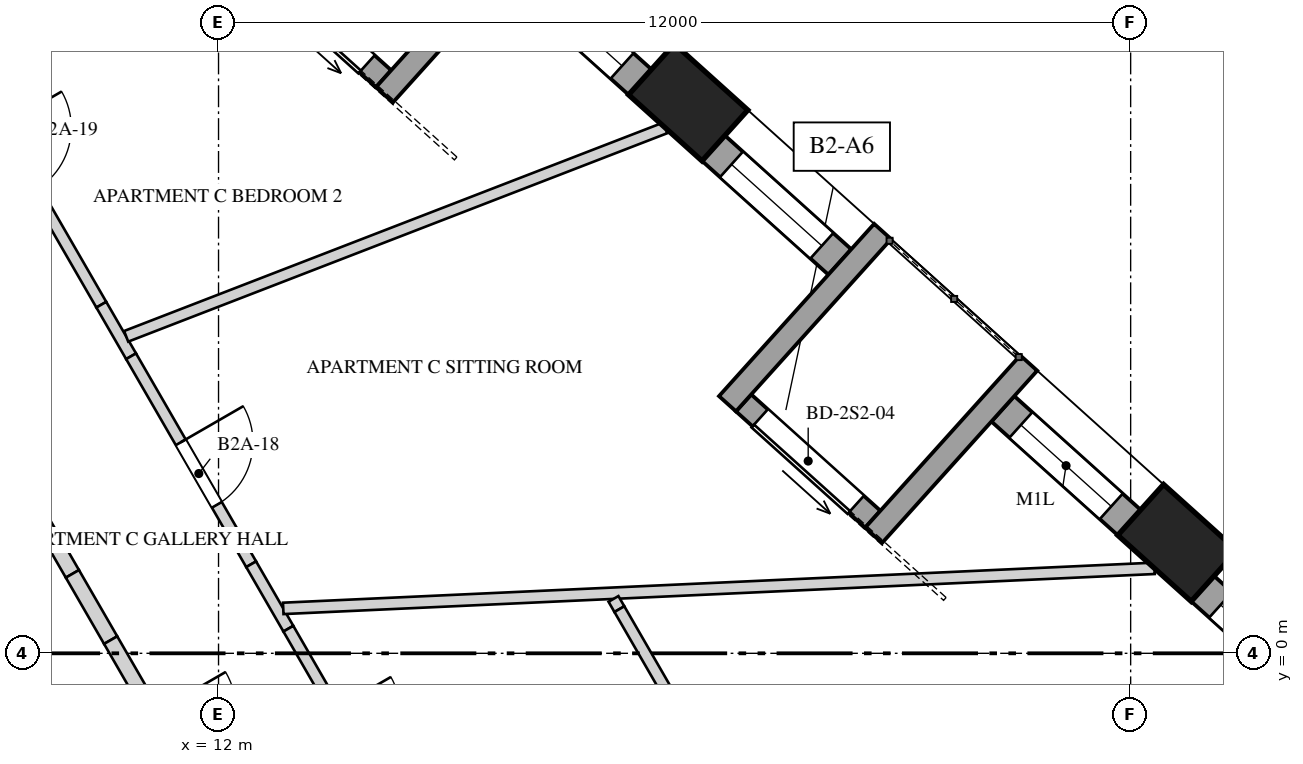
"""IFC4 building model, lengths in metres.
Left out: names, types, materials, properties, quantities, classifications, styles, units other than length and angle.
Written with IfcOpenShell. Run it as: python <this file> out.ifc"""

import sys

from ifc_helpers import new_model, si_unit, direction, frame, frame_2d, origin, origin_2d, place, context, subcontext, project, spatial, rectangle, extrude, element, fill, save


model = new_model("IFC4")
c1 = context("Model", 3, precision=1e-05, world=origin(), true_north=direction((0.0, 1.0)))
c2 = subcontext(c1, "Body", "Model", "MODEL_VIEW")
j1 = project(units=[si_unit("LENGTHUNIT", "METRE"), si_unit("PLANEANGLEUNIT", "RADIAN")], contexts=[c1])
p1 = place(None, origin())
s1 = spatial("IfcSite", under=j1, at=p1, CompositionType="ELEMENT")
p2 = place(p1, origin())
s2 = spatial("IfcBuilding", under=s1, at=p2, CompositionType="ELEMENT")
p3 = place(p2, frame((0.0, 0.0, 88.4)))
s3 = spatial("IfcBuildingStorey", under=s2, at=p3, CompositionType="ELEMENT", Elevation=88.4)
p4 = place(p3, frame((9.699, -4.25, 0.0), z_axis=(0.0, 0.0, 1.0), x_axis=(-0.499999102847, 0.866025921755, 0.0)))
e1 = element("IfcWall", 1, at=p4, inside=s3, PredefinedType="SHEAR", context=c2, shape_type="SweptSolid", body=[
    extrude(rectangle(XDim=17.061, YDim=0.95, at=frame_2d((8.53, 0.0))), origin(), (0.0, 0.0, 1.0), 4.0),
])
p5 = place(p4, frame((6.805, 0.0, 0.0)))
e2 = element("IfcOpeningElement", 2, at=p5, cuts=e1, PredefinedType="OPENING", context=c2, shape_type="SweptSolid", body=[
    extrude(rectangle(XDim=1.0, YDim=2.4, at=frame_2d((0.5, 1.2))), frame((0.0, 0.485, 0.0), z_axis=(0.0, -1.0, 0.0), x_axis=(1.0, 0.0, 0.0)), (0.0, 0.0, 1.0), 0.97),
])
for number, where, z_axis, x_axis in (
    (3, (24.615, 1.452, -0.35), (0.0, 0.0, 1.0), (-0.743, 0.669, 0.0)),
    (4, (18.179, 7.247, -0.35), (0.0, 0.0, 1.0), (-0.743, 0.669, 0.0)),
):
    element("IfcColumn", number, at=place(p3, frame(where, z_axis=z_axis, x_axis=x_axis)), inside=s3, PredefinedType="COLUMN", context=c2, shape_type="SweptSolid", body=[
        extrude(rectangle(XDim=1.3, YDim=0.9, at=origin_2d()), origin(), (0.0, 0.0, 1.0), 4.35),
    ])
p6 = place(p3, frame((29.86, -3.573, 0.0), z_axis=(0.0, 0.0, 1.0), x_axis=(-0.743161908204, 0.669111633582, 0.0)))
e5 = element("IfcWall", 5, at=p6, inside=s3, PredefinedType="SOLIDWALL", context=c2, shape_type="SweptSolid", body=[
    extrude(rectangle(XDim=6.61, YDim=0.45, at=frame_2d((3.305, 0.0))), origin(), (0.0, 0.0, 1.0), 3.3),
])
p7 = place(p6, frame((0.243, 0.0, 0.7)))
e6 = element("IfcOpeningElement", 6, at=p7, cuts=e5, PredefinedType="OPENING", context=c2, shape_type="SweptSolid", body=[
    extrude(rectangle(XDim=1.0, YDim=1.8, at=frame_2d((0.5, 0.9))), frame((0.0, 0.235, 0.0), z_axis=(0.0, -1.0, 0.0), x_axis=(1.0, 0.0, 0.0)), (0.0, 0.0, 1.0), 0.47),
])
p8 = place(p6, frame((2.13, 0.0, 0.7)))
e7 = element("IfcOpeningElement", 7, at=p8, cuts=e5, PredefinedType="OPENING", context=c2, shape_type="SweptSolid", body=[
    extrude(rectangle(XDim=1.6, YDim=2.3, at=frame_2d((0.8, 1.15))), frame((0.0, 0.235, 0.0), z_axis=(0.0, -1.0, 0.0), x_axis=(1.0, 0.0, 0.0)), (0.0, 0.0, 1.0), 0.47),
])
p9 = place(p6, frame((4.692, 0.0, 0.7)))
e8 = element("IfcOpeningElement", 8, at=p9, cuts=e5, PredefinedType="OPENING", context=c2, shape_type="SweptSolid", body=[
    extrude(rectangle(XDim=1.6, YDim=2.3, at=frame_2d((0.8, 1.15))), frame((0.0, 0.235, 0.0), z_axis=(0.0, -1.0, 0.0), x_axis=(1.0, 0.0, 0.0)), (0.0, 0.0, 1.0), 0.47),
])
p10 = place(p3, frame((23.981, 1.72, 0.0), z_axis=(0.0, 0.0, 1.0), x_axis=(-0.743142151309, 0.669133576311, 0.0)))
e9 = element("IfcWall", 9, at=p10, inside=s3, PredefinedType="SOLIDWALL", context=c2, shape_type="SweptSolid", body=[
    extrude(rectangle(XDim=2.237, YDim=0.45, at=frame_2d((1.118, 0.0))), origin(), (0.0, 0.0, 1.0), 3.3),
])
p11 = place(p10, frame((0.318, 0.0, 0.7)))
e10 = element("IfcOpeningElement", 10, at=p11, cuts=e9, PredefinedType="OPENING", context=c2, shape_type="SweptSolid", body=[
    extrude(rectangle(XDim=1.6, YDim=1.8, at=frame_2d((0.8, 0.9))), frame((0.0, 0.235, 0.0), z_axis=(0.0, -1.0, 0.0), x_axis=(1.0, 0.0, 0.0)), (0.0, 0.0, 1.0), 0.47),
])
p12 = place(p3, frame((20.174, 5.148, 0.0), z_axis=(0.0, 0.0, 1.0), x_axis=(-0.743136746477, 0.669139578889, 0.0)))
e11 = element("IfcWall", 11, at=p12, inside=s3, PredefinedType="SOLIDWALL", context=c2, shape_type="SweptSolid", body=[
    extrude(rectangle(XDim=2.237, YDim=0.45, at=frame_2d((1.119, 0.0))), origin(), (0.0, 0.0, 1.0), 3.3),
])
p13 = place(p12, frame((0.318, 0.0, 0.7)))
e12 = element("IfcOpeningElement", 12, at=p13, cuts=e11, PredefinedType="OPENING", context=c2, shape_type="SweptSolid", body=[
    extrude(rectangle(XDim=1.6, YDim=2.3, at=frame_2d((0.8, 1.15))), frame((0.0, 0.235, 0.0), z_axis=(0.0, -1.0, 0.0), x_axis=(1.0, 0.0, 0.0)), (0.0, 0.0, 1.0), 0.47),
])
p14 = place(p3, frame((17.545, 7.515, 0.0), z_axis=(0.0, 0.0, 1.0), x_axis=(-0.743142151309, 0.669133576311, 0.0)))
e13 = element("IfcWall", 13, at=p14, inside=s3, PredefinedType="SOLIDWALL", context=c2, shape_type="SweptSolid", body=[
    extrude(rectangle(XDim=2.237, YDim=0.45, at=frame_2d((1.118, 0.0))), origin(), (0.0, 0.0, 1.0), 3.3),
])
p15 = place(p14, frame((0.318, 0.0, 0.7)))
e14 = element("IfcOpeningElement", 14, at=p15, cuts=e13, PredefinedType="OPENING", context=c2, shape_type="SweptSolid", body=[
    extrude(rectangle(XDim=1.6, YDim=2.3, at=frame_2d((0.8, 1.15))), frame((0.0, 0.235, 0.0), z_axis=(0.0, -1.0, 0.0), x_axis=(1.0, 0.0, 0.0)), (0.0, 0.0, 1.0), 0.47),
])
p16 = place(p3, frame((20.607, 1.764, 0.0), z_axis=(0.0, 0.0, 1.0), x_axis=(-0.743182653308, 0.669088591909, 0.0)))
e15 = element("IfcWall", 15, at=p16, inside=s3, PredefinedType="SOLIDWALL", context=c2, shape_type="SweptSolid", body=[
    extrude(rectangle(XDim=2.287, YDim=0.3, at=frame_2d((1.143, 0.0))), origin(), (0.0, 0.0, 1.0), 3.3),
])
p17 = place(p16, frame((0.293, 0.0, 0.0)))
e16 = element("IfcOpeningElement", 16, at=p17, cuts=e15, PredefinedType="OPENING", context=c2, shape_type="SweptSolid", body=[
    extrude(rectangle(XDim=1.7, YDim=2.4, at=frame_2d((0.85, 1.2))), frame((0.0, 0.16, 0.0), z_axis=(0.0, -1.0, 0.0), x_axis=(1.0, 0.0, 0.0)), (0.0, 0.0, 1.0), 0.32),
])
for number, where, z_axis, x_axis in (
    (17, (22.659, 3.819, 0.0), (0.0, 0.0, 1.0), (-0.669, -0.743, 0.0)),
    (18, (20.737, 5.55, 0.0), (0.0, 0.0, 1.0), (-0.669, -0.743, 0.0)),
):
    element("IfcWall", number, at=place(p3, frame(where, z_axis=z_axis, x_axis=x_axis)), inside=s3, PredefinedType="SOLIDWALL", context=c2, shape_type="SweptSolid", body=[
        extrude(rectangle(XDim=3.05, YDim=0.3, at=frame_2d((1.525, 0.0))), origin(), (0.0, 0.0, 1.0), 3.3),
    ])
p18 = place(p3, frame((14.171, 7.559, 0.0), z_axis=(0.0, 0.0, 1.0), x_axis=(-0.743134851659, 0.66914168324, 0.0)))
e19 = element("IfcWall", 19, at=p18, inside=s3, PredefinedType="SOLIDWALL", context=c2, shape_type="SweptSolid", body=[
    extrude(rectangle(XDim=2.287, YDim=0.3, at=frame_2d((1.143, 0.0))), origin(), (0.0, 0.0, 1.0), 3.3),
])
p19 = place(p18, frame((0.293, 0.0, 0.0)))
e20 = element("IfcOpeningElement", 20, at=p19, cuts=e19, PredefinedType="OPENING", context=c2, shape_type="SweptSolid", body=[
    extrude(rectangle(XDim=1.7, YDim=2.4, at=frame_2d((0.85, 1.2))), frame((0.0, 0.16, 0.0), z_axis=(0.0, -1.0, 0.0), x_axis=(1.0, 0.0, 0.0)), (0.0, 0.0, 1.0), 0.32),
])
p20 = place(p3, frame((16.223, 9.614, 0.0), z_axis=(0.0, 0.0, 1.0), x_axis=(-0.669115082961, -0.743158802514, 0.0)))
e21 = element("IfcWall", 21, at=p20, inside=s3, PredefinedType="SOLIDWALL", context=c2, shape_type="SweptSolid", body=[
    extrude(rectangle(XDim=3.05, YDim=0.3, at=frame_2d((1.525, 0.0))), origin(), (0.0, 0.0, 1.0), 3.3),
])
p21 = place(p3, frame((8.163, 8.562, 0.0), z_axis=(0.0, 0.0, 1.0), x_axis=(0.500023253097, -0.866011978186, 0.0)))
e22 = element("IfcWall", 22, at=p21, inside=s3, PredefinedType="PARTITIONING", context=c2, shape_type="SweptSolid", body=[
    extrude(rectangle(XDim=4.59, YDim=0.15, at=frame_2d((2.295, 0.0))), origin(), (0.0, 0.0, 1.0), 3.65),
])
p22 = place(p21, frame((1.9, 0.0, 0.0)))
e23 = element("IfcOpeningElement", 23, at=p22, cuts=e22, PredefinedType="OPENING", context=c2, shape_type="SweptSolid", body=[
    extrude(rectangle(XDim=0.95, YDim=2.4, at=frame_2d((0.475, 1.2))), frame((0.0, 0.085, 0.0), z_axis=(0.0, -1.0, 0.0), x_axis=(1.0, 0.0, 0.0)), (0.0, 0.0, 1.0), 0.17),
])
p23 = place(p3, frame((10.458, 4.586, 0.0), z_axis=(0.0, 0.0, 1.0), x_axis=(0.49979442921, -0.866144057608, 0.0)))
e24 = element("IfcWall", 24, at=p23, inside=s3, PredefinedType="PARTITIONING", context=c2, shape_type="SweptSolid", body=[
    extrude(rectangle(XDim=0.783, YDim=0.15, at=frame_2d((0.392, 0.0))), origin(), (0.0, 0.0, 1.0), 2.75),
])
p24 = place(p3, frame((10.849, 3.908, 0.0), z_axis=(0.0, 0.0, 1.0), x_axis=(0.500027861653, -0.866009317254, 0.0)))
e25 = element("IfcWall", 25, at=p24, inside=s3, PredefinedType="PARTITIONING", context=c2, shape_type="SweptSolid", body=[
    extrude(rectangle(XDim=3.16, YDim=0.15, at=frame_2d((1.58, 0.0))), origin(), (0.0, 0.0, 1.0), 3.65),
])
p25 = place(p24, frame((1.307, 0.0, 0.0)))
e26 = element("IfcOpeningElement", 26, at=p25, cuts=e25, PredefinedType="OPENING", context=c2, shape_type="SweptSolid", body=[
    extrude(rectangle(XDim=0.95, YDim=2.4, at=frame_2d((0.475, 1.2))), frame((0.0, 0.085, 0.0), z_axis=(0.0, -1.0, 0.0), x_axis=(1.0, 0.0, 0.0)), (0.0, 0.0, 1.0), 0.17),
])
p26 = place(p3, frame((12.429, 1.172, 0.0), z_axis=(0.0, 0.0, 1.0), x_axis=(0.499895202697, -0.866085900082, 0.0)))
e27 = element("IfcWall", 27, at=p26, inside=s3, PredefinedType="PARTITIONING", context=c2, shape_type="SweptSolid", body=[
    extrude(rectangle(XDim=0.979, YDim=0.15, at=frame_2d((0.489, 0.0))), origin(), (0.0, 0.0, 1.0), 2.55),
])
p27 = place(p3, frame((12.919, 0.324, 0.0), z_axis=(0.0, 0.0, 1.0), x_axis=(0.500028278809, -0.866009076391, 0.0)))
e28 = element("IfcWall", 28, at=p27, inside=s3, PredefinedType="PARTITIONING", context=c2, shape_type="SweptSolid", body=[
    extrude(rectangle(XDim=1.175, YDim=0.15, at=frame_2d((0.587, 0.0))), origin(), (0.0, 0.0, 1.0), 3.65),
])
p28 = place(p3, frame((10.785, 4.17, 0.0), z_axis=(0.0, 0.0, 1.0), x_axis=(0.932701213241, 0.360650033716, 0.0)))
e29 = element("IfcWall", 29, at=p28, inside=s3, PredefinedType="PARTITIONING", context=c2, shape_type="SweptSolid", body=[
    extrude(rectangle(XDim=7.605, YDim=0.15, at=frame_2d((3.802, 0.0))), origin(), (0.0, 0.0, 1.0), 2.75),
])
p29 = place(p3, frame((11.442, 12.708, 0.0), z_axis=(0.0, 0.0, 1.0), x_axis=(-0.66912430182, -0.743150502061, 0.0)))
e30 = element("IfcWall", 30, at=p29, inside=s3, PredefinedType="SOLIDWALL", context=c2, shape_type="SweptSolid", body=[
    extrude(rectangle(XDim=7.269, YDim=0.25, at=frame_2d((3.634, 0.0))), origin(), (0.0, 0.0, 1.0), 2.95),
])
p30 = place(p3, frame((12.851, 0.591, 0.0), z_axis=(0.0, 0.0, 1.0), x_axis=(0.998944359646, 0.045936546805, 0.0)))
e31 = element("IfcWall", 31, at=p30, inside=s3, PredefinedType="PARTITIONING", context=c2, shape_type="SweptSolid", body=[
    extrude(rectangle(XDim=11.475, YDim=0.15, at=frame_2d((5.737, 0.0))), origin(), (0.0, 0.0, 1.0), 2.55),
])
p31 = place(p3, frame((17.196, 0.716, 0.0), z_axis=(0.0, 0.0, 1.0), x_axis=(0.499858525911, -0.866107068482, 0.0)))
e32 = element("IfcWall", 32, at=p31, inside=s3, PredefinedType="PARTITIONING", context=c2, shape_type="SweptSolid", body=[
    extrude(rectangle(XDim=0.155, YDim=0.15, at=frame_2d((0.078, 0.0))), origin(), (0.0, 0.0, 1.0), 2.55),
])
p32 = place(p3, frame((17.274, 0.581, 0.0), z_axis=(0.0, 0.0, 1.0), x_axis=(0.500037354383, -0.866003836147, 0.0)))
e33 = element("IfcWall", 33, at=p32, inside=s3, PredefinedType="PARTITIONING", context=c2, shape_type="SweptSolid", body=[
    extrude(rectangle(XDim=3.065, YDim=0.15, at=frame_2d((1.532, 0.0))), origin(), (0.0, 0.0, 1.0), 3.65),
])
p33 = place(p3, frame((8.885, 3.111, 0.0), z_axis=(0.0, 0.0, 1.0), x_axis=(0.500035462246, -0.866004928679, 0.0)))
e34 = element("IfcWall", 34, at=p33, inside=s3, PredefinedType="SOLIDWALL", context=c2, shape_type="SweptSolid", body=[
    extrude(rectangle(XDim=2.385, YDim=0.2, at=frame_2d((1.193, 0.0))), origin(), (0.0, 0.0, 1.0), 3.65),
])
p34 = place(p3, frame((10.077, 1.045, 0.0), z_axis=(0.0, 0.0, 1.0), x_axis=(0.500051323872, -0.865995769906, 0.0)))
e35 = element("IfcWall", 35, at=p34, inside=s3, PredefinedType="SOLIDWALL", context=c2, shape_type="SweptSolid", body=[
    extrude(rectangle(XDim=1.007, YDim=0.2, at=frame_2d((0.503, 0.0))), origin(), (0.0, 0.0, 1.0), 2.55),
])
p35 = place(p3, frame((10.581, 0.174, 0.0), z_axis=(0.0, 0.0, 1.0), x_axis=(0.499920058375, -0.866071553184, 0.0)))
e36 = element("IfcWall", 36, at=p35, inside=s3, PredefinedType="SOLIDWALL", context=c2, shape_type="SweptSolid", body=[
    extrude(rectangle(XDim=1.07, YDim=0.2, at=frame_2d((0.535, 0.0))), origin(), (0.0, 0.0, 1.0), 3.65),
])
p36 = place(p9, origin())
e37 = element("IfcWindow", 37, at=p36, inside=s3, PartitioningType="SINGLE_PANEL", PredefinedType="WINDOW", context=c2, shape_type="SweptSolid", body=[
    extrude(rectangle(XDim=1.6, YDim=2.3, at=frame_2d((0.8, 1.15))), frame((0.0, 0.03, 0.0), z_axis=(0.0, -1.0, 0.0), x_axis=(1.0, 0.0, 0.0)), (0.0, 0.0, 1.0), 0.06),
])
fill(e8, e37)
p37 = place(p11, origin())
e38 = element("IfcWindow", 38, at=p37, inside=s3, PartitioningType="SINGLE_PANEL", PredefinedType="WINDOW", context=c2, shape_type="SweptSolid", body=[
    extrude(rectangle(XDim=1.6, YDim=1.8, at=frame_2d((0.8, 0.9))), frame((0.0, 0.03, 0.0), z_axis=(0.0, -1.0, 0.0), x_axis=(1.0, 0.0, 0.0)), (0.0, 0.0, 1.0), 0.06),
])
fill(e10, e38)
p38 = place(p13, origin())
e39 = element("IfcWindow", 39, at=p38, inside=s3, PartitioningType="SINGLE_PANEL", PredefinedType="WINDOW", context=c2, shape_type="SweptSolid", body=[
    extrude(rectangle(XDim=1.6, YDim=2.3, at=frame_2d((0.8, 1.15))), frame((0.0, 0.03, 0.0), z_axis=(0.0, -1.0, 0.0), x_axis=(1.0, 0.0, 0.0)), (0.0, 0.0, 1.0), 0.06),
])
fill(e12, e39)
p39 = place(p15, origin())
e40 = element("IfcWindow", 40, at=p39, inside=s3, PartitioningType="SINGLE_PANEL", PredefinedType="WINDOW", context=c2, shape_type="SweptSolid", body=[
    extrude(rectangle(XDim=1.6, YDim=2.3, at=frame_2d((0.8, 1.15))), frame((0.0, 0.03, 0.0), z_axis=(0.0, -1.0, 0.0), x_axis=(1.0, 0.0, 0.0)), (0.0, 0.0, 1.0), 0.06),
])
fill(e14, e40)
p40 = place(p17, origin())
e41 = element("IfcDoor", 41, at=p40, inside=s3, OperationType="SLIDING_TO_LEFT", PredefinedType="DOOR", context=c2, shape_type="SweptSolid", body=[
    extrude(rectangle(XDim=1.7, YDim=2.4, at=frame_2d((0.85, 1.2))), frame((0.0, 0.025, 0.0), z_axis=(0.0, -1.0, 0.0), x_axis=(1.0, 0.0, 0.0)), (0.0, 0.0, 1.0), 0.05),
])
fill(e16, e41)
p41 = place(p19, origin())
e42 = element("IfcDoor", 42, at=p41, inside=s3, OperationType="SLIDING_TO_LEFT", PredefinedType="DOOR", context=c2, shape_type="SweptSolid", body=[
    extrude(rectangle(XDim=1.7, YDim=2.4, at=frame_2d((0.85, 1.2))), frame((0.0, 0.025, 0.0), z_axis=(0.0, -1.0, 0.0), x_axis=(1.0, 0.0, 0.0)), (0.0, 0.0, 1.0), 0.05),
])
fill(e20, e42)
p42 = place(p25, origin())
e43 = element("IfcDoor", 43, at=p42, inside=s3, OperationType="SINGLE_SWING_RIGHT", PredefinedType="DOOR", context=c2, shape_type="SweptSolid", body=[
    extrude(rectangle(XDim=0.95, YDim=2.4, at=frame_2d((0.475, 1.2))), frame((0.0, 0.025, 0.0), z_axis=(0.0, -1.0, 0.0), x_axis=(1.0, 0.0, 0.0)), (0.0, 0.0, 1.0), 0.05),
])
fill(e26, e43)
save(model, sys.argv[1])
